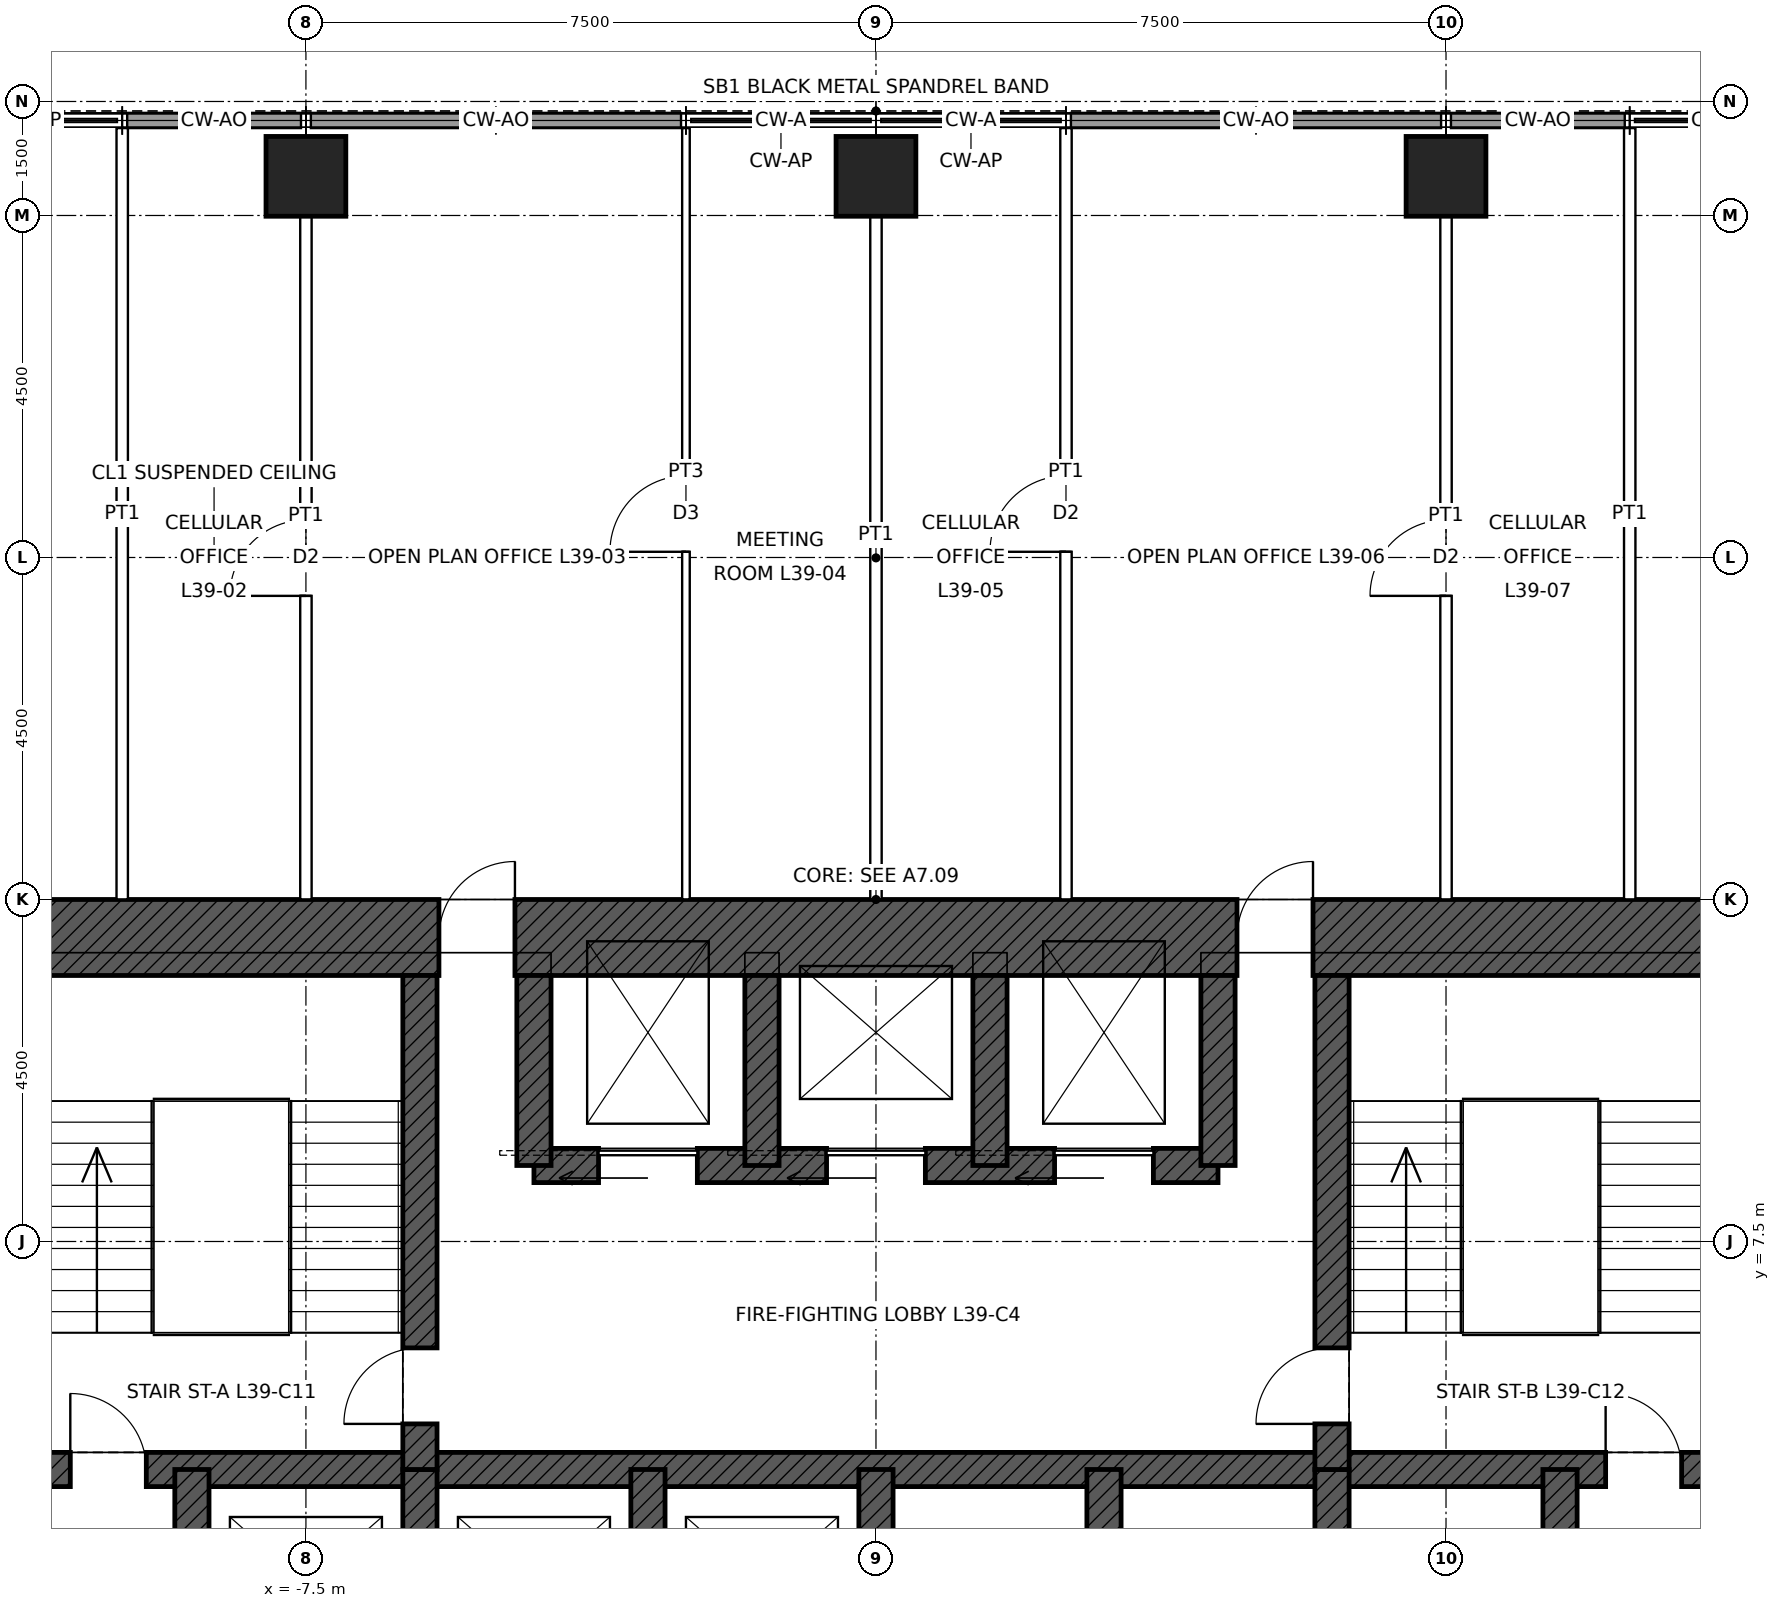
"""IFC4 building model, lengths in metres.
Left out: names, types, materials, properties, quantities, classifications, styles, units other than length and angle.
Written with IfcOpenShell. Run it as: python <this file> out.ifc"""

import sys

from ifc_helpers import new_model, si_unit, direction, frame, frame_2d, origin, origin_2d, place, context, subcontext, project, spatial, rectangle, hollow_rectangle, extrude, element, fill, save


model = new_model("IFC4")
c1 = context("Model", 3, precision=1e-05, world=origin(), true_north=direction((0.0, 1.0)))
c2 = subcontext(c1, "Body", "Model", "MODEL_VIEW")
j1 = project(units=[si_unit("LENGTHUNIT", "METRE"), si_unit("PLANEANGLEUNIT", "RADIAN")], contexts=[c1])
p1 = place(None, origin())
s1 = spatial("IfcSite", under=j1, at=p1, CompositionType="ELEMENT")
p2 = place(p1, origin())
s2 = spatial("IfcBuilding", under=s1, at=p2, CompositionType="ELEMENT")
p3 = place(p2, frame((0.0, 0.0, 189.9)))
s3 = spatial("IfcBuildingStorey", under=s2, at=p3, CompositionType="ELEMENT", Elevation=189.9)
for number, where, z_axis, x_axis in (
    (1, (-7.5, 21.515, 0.0), (0.0, 0.0, 1.0), (1.0, 0.0, 0.0)),
    (2, (0.0, 21.515, 0.0), (0.0, 0.0, 1.0), (1.0, 0.0, 0.0)),
    (3, (7.5, 21.515, 0.0), (0.0, 0.0, 1.0), (1.0, 0.0, 0.0)),
):
    element("IfcColumn", number, at=place(p3, frame(where, z_axis=z_axis, x_axis=x_axis)), inside=s3, PredefinedType="COLUMN", context=c2, shape_type="SweptSolid", body=[
        extrude(hollow_rectangle(XDim=1.05, YDim=1.05, WallThickness=0.07, at=origin_2d()), origin(), (0.0, 0.0, 1.0), 4.0),
    ])
p4 = place(p3, frame((-12.0, 11.5, 0.0), z_axis=(0.0, 0.0, 1.0), x_axis=(1.0, 0.0, 0.0)))
e4 = element("IfcWall", 4, at=p4, inside=s3, PredefinedType="SHEAR", context=c2, shape_type="SweptSolid", body=[
    extrude(rectangle(XDim=24.0, YDim=1.0, at=frame_2d((12.0, 0.0))), origin(), (0.0, 0.0, 1.0), 4.0),
])
p5 = place(p4, frame((6.25, 0.0, 0.0)))
e5 = element("IfcOpeningElement", 5, at=p5, cuts=e4, PredefinedType="OPENING", context=c2, shape_type="SweptSolid", body=[
    extrude(rectangle(XDim=1.0, YDim=2.4, at=frame_2d((0.5, 1.2))), frame((0.0, 0.51, 0.0), z_axis=(0.0, -1.0, 0.0), x_axis=(1.0, 0.0, 0.0)), (0.0, 0.0, 1.0), 1.02),
])
p6 = place(p4, frame((16.75, 0.0, 0.0)))
e6 = element("IfcOpeningElement", 6, at=p6, cuts=e4, PredefinedType="OPENING", context=c2, shape_type="SweptSolid", body=[
    extrude(rectangle(XDim=1.0, YDim=2.4, at=frame_2d((0.5, 1.2))), frame((0.0, 0.51, 0.0), z_axis=(0.0, -1.0, 0.0), x_axis=(1.0, 0.0, 0.0)), (0.0, 0.0, 1.0), 1.02),
])
p7 = place(p3, frame((-11.0, 4.5, 0.0), z_axis=(0.0, 0.0, 1.0), x_axis=(1.0, 0.0, 0.0)))
e7 = element("IfcWall", 7, at=p7, inside=s3, PredefinedType="SHEAR", context=c2, shape_type="SweptSolid", body=[
    extrude(rectangle(XDim=22.0, YDim=0.45, at=frame_2d((11.0, 0.0))), origin(), (0.0, 0.0, 1.0), 4.0),
])
p8 = place(p7, frame((0.4, 0.0, 0.0)))
e8 = element("IfcOpeningElement", 8, at=p8, cuts=e7, PredefinedType="OPENING", context=c2, shape_type="SweptSolid", body=[
    extrude(rectangle(XDim=1.0, YDim=2.1, at=frame_2d((0.5, 1.05))), frame((0.0, 0.235, 0.0), z_axis=(0.0, -1.0, 0.0), x_axis=(1.0, 0.0, 0.0)), (0.0, 0.0, 1.0), 0.47),
])
p9 = place(p7, frame((20.6, 0.0, 0.0)))
e9 = element("IfcOpeningElement", 9, at=p9, cuts=e7, PredefinedType="OPENING", context=c2, shape_type="SweptSolid", body=[
    extrude(rectangle(XDim=1.0, YDim=2.1, at=frame_2d((0.5, 1.05))), frame((0.0, 0.235, 0.0), z_axis=(0.0, -1.0, 0.0), x_axis=(1.0, 0.0, 0.0)), (0.0, 0.0, 1.0), 0.47),
])
p10 = place(p3, frame((-4.5, 8.5, 0.0), z_axis=(0.0, 0.0, 1.0), x_axis=(1.0, 0.0, 0.0)))
e10 = element("IfcWall", 10, at=p10, inside=s3, PredefinedType="SHEAR", context=c2, shape_type="SweptSolid", body=[
    extrude(rectangle(XDim=9.0, YDim=0.45, at=frame_2d((4.5, 0.0))), origin(), (0.0, 0.0, 1.0), 4.0),
])
p11 = place(p10, frame((0.85, 0.0, 0.0)))
e11 = element("IfcOpeningElement", 11, at=p11, cuts=e10, PredefinedType="OPENING", context=c2, shape_type="SweptSolid", body=[
    extrude(rectangle(XDim=1.3, YDim=2.4, at=frame_2d((0.65, 1.2))), frame((0.0, 0.235, 0.0), z_axis=(0.0, -1.0, 0.0), x_axis=(1.0, 0.0, 0.0)), (0.0, 0.0, 1.0), 0.47),
])
p12 = place(p10, frame((6.85, 0.0, 0.0)))
e12 = element("IfcOpeningElement", 12, at=p12, cuts=e10, PredefinedType="OPENING", context=c2, shape_type="SweptSolid", body=[
    extrude(rectangle(XDim=1.3, YDim=2.4, at=frame_2d((0.65, 1.2))), frame((0.0, 0.235, 0.0), z_axis=(0.0, -1.0, 0.0), x_axis=(1.0, 0.0, 0.0)), (0.0, 0.0, 1.0), 0.47),
])
p13 = place(p10, frame((3.85, 0.0, 0.0)))
e13 = element("IfcOpeningElement", 13, at=p13, cuts=e10, PredefinedType="OPENING", context=c2, shape_type="SweptSolid", body=[
    extrude(rectangle(XDim=1.3, YDim=2.4, at=frame_2d((0.65, 1.2))), frame((0.0, 0.235, 0.0), z_axis=(0.0, -1.0, 0.0), x_axis=(1.0, 0.0, 0.0)), (0.0, 0.0, 1.0), 0.47),
])
for number, where, z_axis, x_axis in (
    (14, (-9.0, 1.5, 0.0), (0.0, 0.0, 1.0), (0.0, 1.0, 0.0)),
    (15, (9.0, 1.5, 0.0), (0.0, 0.0, 1.0), (0.0, 1.0, 0.0)),
    (16, (-6.0, 1.5, 0.0), (0.0, 0.0, 1.0), (0.0, 1.0, 0.0)),
    (17, (-3.0, 1.5, 0.0), (0.0, 0.0, 1.0), (0.0, 1.0, 0.0)),
    (18, (0.0, 1.5, 0.0), (0.0, 0.0, 1.0), (0.0, 1.0, 0.0)),
    (19, (3.0, 1.5, 0.0), (0.0, 0.0, 1.0), (0.0, 1.0, 0.0)),
    (20, (6.0, 1.5, 0.0), (0.0, 0.0, 1.0), (0.0, 1.0, 0.0)),
):
    element("IfcWall", number, at=place(p3, frame(where, z_axis=z_axis, x_axis=x_axis)), inside=s3, PredefinedType="SHEAR", context=c2, shape_type="SweptSolid", body=[
        extrude(rectangle(XDim=3.0, YDim=0.45, at=frame_2d((1.5, 0.0))), origin(), (0.0, 0.0, 1.0), 4.0),
    ])
p14 = place(p3, frame((-6.0, 4.5, 0.0), z_axis=(0.0, 0.0, 1.0), x_axis=(0.0, 1.0, 0.0)))
e21 = element("IfcWall", 21, at=p14, inside=s3, PredefinedType="SHEAR", context=c2, shape_type="SweptSolid", body=[
    extrude(rectangle(XDim=6.5, YDim=0.45, at=frame_2d((3.25, 0.0))), origin(), (0.0, 0.0, 1.0), 4.0),
])
p15 = place(p14, frame((0.6, 0.0, 0.0)))
e22 = element("IfcOpeningElement", 22, at=p15, cuts=e21, PredefinedType="OPENING", context=c2, shape_type="SweptSolid", body=[
    extrude(rectangle(XDim=1.0, YDim=2.1, at=frame_2d((0.5, 1.05))), frame((0.0, 0.235, 0.0), z_axis=(0.0, -1.0, 0.0), x_axis=(1.0, 0.0, 0.0)), (0.0, 0.0, 1.0), 0.47),
])
p16 = place(p3, frame((6.0, 4.5, 0.0), z_axis=(0.0, 0.0, 1.0), x_axis=(0.0, 1.0, 0.0)))
e23 = element("IfcWall", 23, at=p16, inside=s3, PredefinedType="SHEAR", context=c2, shape_type="SweptSolid", body=[
    extrude(rectangle(XDim=6.5, YDim=0.45, at=frame_2d((3.25, 0.0))), origin(), (0.0, 0.0, 1.0), 4.0),
])
p17 = place(p16, frame((0.6, 0.0, 0.0)))
e24 = element("IfcOpeningElement", 24, at=p17, cuts=e23, PredefinedType="OPENING", context=c2, shape_type="SweptSolid", body=[
    extrude(rectangle(XDim=1.0, YDim=2.1, at=frame_2d((0.5, 1.05))), frame((0.0, 0.235, 0.0), z_axis=(0.0, -1.0, 0.0), x_axis=(1.0, 0.0, 0.0)), (0.0, 0.0, 1.0), 0.47),
])
for number, where, z_axis, x_axis in (
    (25, (-4.5, 8.5, 0.0), (0.0, 0.0, 1.0), (0.0, 1.0, 0.0)),
    (26, (4.5, 8.5, 0.0), (0.0, 0.0, 1.0), (0.0, 1.0, 0.0)),
    (27, (-1.5, 8.5, 0.0), (0.0, 0.0, 1.0), (0.0, 1.0, 0.0)),
    (28, (1.5, 8.5, 0.0), (0.0, 0.0, 1.0), (0.0, 1.0, 0.0)),
):
    element("IfcWall", number, at=place(p3, frame(where, z_axis=z_axis, x_axis=x_axis)), inside=s3, PredefinedType="SHEAR", context=c2, shape_type="SweptSolid", body=[
        extrude(rectangle(XDim=2.5, YDim=0.45, at=frame_2d((1.25, 0.0))), origin(), (0.0, 0.0, 1.0), 4.0),
    ])
p18 = place(p3, frame((-9.852, 22.25, 0.0), z_axis=(0.0, 0.0, 1.0), x_axis=(1.0, 0.0, 0.0)))
e29 = element("IfcWall", 29, at=p18, inside=s3, PredefinedType="SOLIDWALL", context=c2, shape_type="SweptSolid", body=[
    extrude(rectangle(XDim=2.287, YDim=0.2, at=frame_2d((1.144, 0.0))), origin(), (0.0, 0.0, 1.0), 3.85),
])
for number, where, z_axis, x_axis in (
    (30, (-7.435, 22.25, 0.0), (0.0, 0.0, 1.0), (1.0, 0.0, 0.0)),
    (31, (-4.968, 22.25, 0.0), (0.0, 0.0, 1.0), (1.0, 0.0, 0.0)),
    (32, (2.565, 22.25, 0.0), (0.0, 0.0, 1.0), (1.0, 0.0, 0.0)),
    (33, (5.032, 22.25, 0.0), (0.0, 0.0, 1.0), (1.0, 0.0, 0.0)),
):
    element("IfcWall", number, at=place(p3, frame(where, z_axis=z_axis, x_axis=x_axis)), inside=s3, PredefinedType="SOLIDWALL", context=c2, shape_type="SweptSolid", body=[
        extrude(rectangle(XDim=2.403, YDim=0.2, at=frame_2d((1.201, 0.0))), origin(), (0.0, 0.0, 1.0), 3.85),
    ])
p19 = place(p3, frame((7.565, 22.25, 0.0), z_axis=(0.0, 0.0, 1.0), x_axis=(1.0, 0.0, 0.0)))
e34 = element("IfcWall", 34, at=p19, inside=s3, PredefinedType="SOLIDWALL", context=c2, shape_type="SweptSolid", body=[
    extrude(rectangle(XDim=2.287, YDim=0.2, at=frame_2d((1.144, 0.0))), origin(), (0.0, 0.0, 1.0), 3.85),
])
p20 = place(p3, frame((-9.917, 12.0, 0.0), z_axis=(0.0, 0.0, 1.0), x_axis=(0.0, 1.0, 0.0)))
e35 = element("IfcWall", 35, at=p20, inside=s3, PredefinedType="PARTITIONING", context=c2, shape_type="SweptSolid", body=[
    extrude(rectangle(XDim=10.15, YDim=0.15, at=frame_2d((5.075, 0.0))), origin(), (0.0, 0.0, 1.0), 3.85),
])
p21 = place(p3, frame((-7.5, 12.0, 0.0), z_axis=(0.0, 0.0, 1.0), x_axis=(0.0, 1.0, 0.0)))
e36 = element("IfcWall", 36, at=p21, inside=s3, PredefinedType="PARTITIONING", context=c2, shape_type="SweptSolid", body=[
    extrude(rectangle(XDim=8.99, YDim=0.15, at=frame_2d((4.495, 0.0))), origin(), (0.0, 0.0, 1.0), 3.238),
])
p22 = place(p21, frame((3.995, 0.0, 0.0)))
e37 = element("IfcOpeningElement", 37, at=p22, cuts=e36, PredefinedType="OPENING", context=c2, shape_type="SweptSolid", body=[
    extrude(rectangle(XDim=1.0, YDim=2.1, at=frame_2d((0.5, 1.05))), frame((0.0, 0.085, 0.0), z_axis=(0.0, -1.0, 0.0), x_axis=(1.0, 0.0, 0.0)), (0.0, 0.0, 1.0), 0.17),
])
p23 = place(p3, frame((-2.5, 12.0, 0.0), z_axis=(0.0, 0.0, 1.0), x_axis=(0.0, 1.0, 0.0)))
e38 = element("IfcWall", 38, at=p23, inside=s3, PredefinedType="PARTITIONING", context=c2, shape_type="SweptSolid", body=[
    extrude(rectangle(XDim=10.15, YDim=0.1, at=frame_2d((5.075, 0.0))), origin(), (0.0, 0.0, 1.0), 3.85),
])
p24 = place(p23, frame((4.575, 0.0, 0.0)))
e39 = element("IfcOpeningElement", 39, at=p24, cuts=e38, PredefinedType="OPENING", context=c2, shape_type="SweptSolid", body=[
    extrude(rectangle(XDim=1.0, YDim=2.1, at=frame_2d((0.5, 1.05))), frame((0.0, 0.06, 0.0), z_axis=(0.0, -1.0, 0.0), x_axis=(1.0, 0.0, 0.0)), (0.0, 0.0, 1.0), 0.12),
])
p25 = place(p3, frame((0.0, 12.0, 0.0), z_axis=(0.0, 0.0, 1.0), x_axis=(0.0, 1.0, 0.0)))
e40 = element("IfcWall", 40, at=p25, inside=s3, PredefinedType="PARTITIONING", context=c2, shape_type="SweptSolid", body=[
    extrude(rectangle(XDim=8.99, YDim=0.15, at=frame_2d((4.495, 0.0))), origin(), (0.0, 0.0, 1.0), 3.238),
])
p26 = place(p3, frame((2.5, 12.0, 0.0), z_axis=(0.0, 0.0, 1.0), x_axis=(0.0, 1.0, 0.0)))
e41 = element("IfcWall", 41, at=p26, inside=s3, PredefinedType="PARTITIONING", context=c2, shape_type="SweptSolid", body=[
    extrude(rectangle(XDim=10.15, YDim=0.15, at=frame_2d((5.075, 0.0))), origin(), (0.0, 0.0, 1.0), 3.85),
])
p27 = place(p26, frame((4.575, 0.0, 0.0)))
e42 = element("IfcOpeningElement", 42, at=p27, cuts=e41, PredefinedType="OPENING", context=c2, shape_type="SweptSolid", body=[
    extrude(rectangle(XDim=1.0, YDim=2.1, at=frame_2d((0.5, 1.05))), frame((0.0, 0.085, 0.0), z_axis=(0.0, -1.0, 0.0), x_axis=(1.0, 0.0, 0.0)), (0.0, 0.0, 1.0), 0.17),
])
p28 = place(p3, frame((7.5, 12.0, 0.0), z_axis=(0.0, 0.0, 1.0), x_axis=(0.0, 1.0, 0.0)))
e43 = element("IfcWall", 43, at=p28, inside=s3, PredefinedType="PARTITIONING", context=c2, shape_type="SweptSolid", body=[
    extrude(rectangle(XDim=8.99, YDim=0.15, at=frame_2d((4.495, 0.0))), origin(), (0.0, 0.0, 1.0), 3.238),
])
p29 = place(p28, frame((3.995, 0.0, 0.0)))
e44 = element("IfcOpeningElement", 44, at=p29, cuts=e43, PredefinedType="OPENING", context=c2, shape_type="SweptSolid", body=[
    extrude(rectangle(XDim=1.0, YDim=2.1, at=frame_2d((0.5, 1.05))), frame((0.0, 0.085, 0.0), z_axis=(0.0, -1.0, 0.0), x_axis=(1.0, 0.0, 0.0)), (0.0, 0.0, 1.0), 0.17),
])
p30 = place(p3, frame((9.917, 12.0, 0.0), z_axis=(0.0, 0.0, 1.0), x_axis=(0.0, 1.0, 0.0)))
e45 = element("IfcWall", 45, at=p30, inside=s3, PredefinedType="PARTITIONING", context=c2, shape_type="SweptSolid", body=[
    extrude(rectangle(XDim=10.15, YDim=0.15, at=frame_2d((5.075, 0.0))), origin(), (0.0, 0.0, 1.0), 3.85),
])
p31 = place(p8, origin())
e46 = element("IfcDoor", 46, at=p31, inside=s3, OperationType="SINGLE_SWING_LEFT", PredefinedType="DOOR", context=c2, shape_type="SweptSolid", body=[
    extrude(rectangle(XDim=1.0, YDim=2.1, at=frame_2d((0.5, 1.05))), frame((0.0, 0.025, 0.0), z_axis=(0.0, -1.0, 0.0), x_axis=(1.0, 0.0, 0.0)), (0.0, 0.0, 1.0), 0.05),
])
fill(e8, e46)
p32 = place(p9, origin())
e47 = element("IfcDoor", 47, at=p32, inside=s3, OperationType="SINGLE_SWING_LEFT", PredefinedType="DOOR", context=c2, shape_type="SweptSolid", body=[
    extrude(rectangle(XDim=1.0, YDim=2.1, at=frame_2d((0.5, 1.05))), frame((0.0, 0.025, 0.0), z_axis=(0.0, -1.0, 0.0), x_axis=(1.0, 0.0, 0.0)), (0.0, 0.0, 1.0), 0.05),
])
fill(e9, e47)
p33 = place(p15, origin())
e48 = element("IfcDoor", 48, at=p33, inside=s3, OperationType="SINGLE_SWING_LEFT", PredefinedType="DOOR", context=c2, shape_type="SweptSolid", body=[
    extrude(rectangle(XDim=1.0, YDim=2.1, at=frame_2d((0.5, 1.05))), frame((0.0, 0.025, 0.0), z_axis=(0.0, -1.0, 0.0), x_axis=(1.0, 0.0, 0.0)), (0.0, 0.0, 1.0), 0.05),
])
fill(e22, e48)
p34 = place(p17, origin())
e49 = element("IfcDoor", 49, at=p34, inside=s3, OperationType="SINGLE_SWING_LEFT", PredefinedType="DOOR", context=c2, shape_type="SweptSolid", body=[
    extrude(rectangle(XDim=1.0, YDim=2.1, at=frame_2d((0.5, 1.05))), frame((0.0, 0.025, 0.0), z_axis=(0.0, -1.0, 0.0), x_axis=(1.0, 0.0, 0.0)), (0.0, 0.0, 1.0), 0.05),
])
fill(e24, e49)
p35 = place(p5, origin())
e50 = element("IfcDoor", 50, at=p35, inside=s3, OperationType="SINGLE_SWING_RIGHT", PredefinedType="DOOR", context=c2, shape_type="SweptSolid", body=[
    extrude(rectangle(XDim=1.0, YDim=2.4, at=frame_2d((0.5, 1.2))), frame((0.0, 0.485, 0.0), z_axis=(0.0, -1.0, 0.0), x_axis=(1.0, 0.0, 0.0)), (0.0, 0.0, 1.0), 0.05),
])
fill(e5, e50)
p36 = place(p6, origin())
e51 = element("IfcDoor", 51, at=p36, inside=s3, OperationType="SINGLE_SWING_RIGHT", PredefinedType="DOOR", context=c2, shape_type="SweptSolid", body=[
    extrude(rectangle(XDim=1.0, YDim=2.4, at=frame_2d((0.5, 1.2))), frame((0.0, 0.485, 0.0), z_axis=(0.0, -1.0, 0.0), x_axis=(1.0, 0.0, 0.0)), (0.0, 0.0, 1.0), 0.05),
])
fill(e6, e51)
p37 = place(p11, origin())
e52 = element("IfcDoor", 52, at=p37, inside=s3, OperationType="SLIDING_TO_LEFT", PredefinedType="DOOR", context=c2, shape_type="SweptSolid", body=[
    extrude(rectangle(XDim=1.3, YDim=2.4, at=frame_2d((0.65, 1.2))), frame((0.0, 0.025, 0.0), z_axis=(0.0, -1.0, 0.0), x_axis=(1.0, 0.0, 0.0)), (0.0, 0.0, 1.0), 0.05),
])
fill(e11, e52)
p38 = place(p12, origin())
e53 = element("IfcDoor", 53, at=p38, inside=s3, OperationType="SLIDING_TO_LEFT", PredefinedType="DOOR", context=c2, shape_type="SweptSolid", body=[
    extrude(rectangle(XDim=1.3, YDim=2.4, at=frame_2d((0.65, 1.2))), frame((0.0, 0.025, 0.0), z_axis=(0.0, -1.0, 0.0), x_axis=(1.0, 0.0, 0.0)), (0.0, 0.0, 1.0), 0.05),
])
fill(e12, e53)
p39 = place(p13, origin())
e54 = element("IfcDoor", 54, at=p39, inside=s3, OperationType="SLIDING_TO_LEFT", PredefinedType="DOOR", context=c2, shape_type="SweptSolid", body=[
    extrude(rectangle(XDim=1.3, YDim=2.4, at=frame_2d((0.65, 1.2))), frame((0.0, 0.025, 0.0), z_axis=(0.0, -1.0, 0.0), x_axis=(1.0, 0.0, 0.0)), (0.0, 0.0, 1.0), 0.05),
])
fill(e13, e54)
p40 = place(p22, origin())
e55 = element("IfcDoor", 55, at=p40, inside=s3, OperationType="SINGLE_SWING_LEFT", PredefinedType="DOOR", context=c2, shape_type="SweptSolid", body=[
    extrude(rectangle(XDim=1.0, YDim=2.1, at=frame_2d((0.5, 1.05))), frame((0.0, 0.025, 0.0), z_axis=(0.0, -1.0, 0.0), x_axis=(1.0, 0.0, 0.0)), (0.0, 0.0, 1.0), 0.05),
])
fill(e37, e55)
p41 = place(p24, origin())
e56 = element("IfcDoor", 56, at=p41, inside=s3, OperationType="SINGLE_SWING_LEFT", PredefinedType="DOOR", context=c2, shape_type="SweptSolid", body=[
    extrude(rectangle(XDim=1.0, YDim=2.1, at=frame_2d((0.5, 1.05))), frame((0.0, 0.025, 0.0), z_axis=(0.0, -1.0, 0.0), x_axis=(1.0, 0.0, 0.0)), (0.0, 0.0, 1.0), 0.05),
])
fill(e39, e56)
p42 = place(p27, origin())
e57 = element("IfcDoor", 57, at=p42, inside=s3, OperationType="SINGLE_SWING_LEFT", PredefinedType="DOOR", context=c2, shape_type="SweptSolid", body=[
    extrude(rectangle(XDim=1.0, YDim=2.1, at=frame_2d((0.5, 1.05))), frame((0.0, 0.025, 0.0), z_axis=(0.0, -1.0, 0.0), x_axis=(1.0, 0.0, 0.0)), (0.0, 0.0, 1.0), 0.05),
])
fill(e42, e57)
p43 = place(p29, origin())
e58 = element("IfcDoor", 58, at=p43, inside=s3, OperationType="SINGLE_SWING_LEFT", PredefinedType="DOOR", context=c2, shape_type="SweptSolid", body=[
    extrude(rectangle(XDim=1.0, YDim=2.1, at=frame_2d((0.5, 1.05))), frame((0.0, 0.025, 0.0), z_axis=(0.0, -1.0, 0.0), x_axis=(1.0, 0.0, 0.0)), (0.0, 0.0, 1.0), 0.05),
])
fill(e44, e58)
save(model, sys.argv[1])
